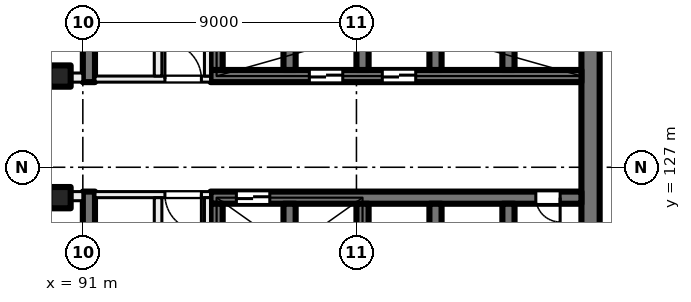
"""IFC4 building model, lengths in metres.
Left out: names, types, materials, properties, quantities, classifications, styles, units other than length and angle.
Written with IfcOpenShell. Run it as: python <this file> out.ifc"""

import sys

from ifc_helpers import new_model, si_unit, direction, frame, frame_2d, origin, origin_2d, place, context, subcontext, project, spatial, rectangle, extrude, element, fill, save


model = new_model("IFC4")
c1 = context("Model", 3, precision=1e-05, world=origin(), true_north=direction((0.0, 1.0)))
c2 = subcontext(c1, "Body", "Model", "MODEL_VIEW")
j1 = project(units=[si_unit("LENGTHUNIT", "METRE"), si_unit("PLANEANGLEUNIT", "RADIAN")], contexts=[c1])
p1 = place(None, origin())
s1 = spatial("IfcSite", under=j1, at=p1, CompositionType="ELEMENT")
p2 = place(p1, origin())
s2 = spatial("IfcBuilding", under=s1, at=p2, CompositionType="ELEMENT")
p3 = place(p2, frame((0.0, 0.0, 59.5)))
s3 = spatial("IfcBuildingStorey", under=s2, at=p3, CompositionType="ELEMENT", Elevation=59.5)
for number, where, z_axis, x_axis in (
    (1, (90.25, 130.0, 0.0), (0.0, 0.0, 1.0), (1.0, 0.0, 0.0)),
    (2, (90.25, 126.0, 0.0), (0.0, 0.0, 1.0), (1.0, 0.0, 0.0)),
):
    element("IfcColumn", number, at=place(p3, frame(where, z_axis=z_axis, x_axis=x_axis)), inside=s3, PredefinedType="COLUMN", context=c2, shape_type="SweptSolid", body=[
        extrude(rectangle(XDim=0.7, YDim=0.7, at=origin_2d()), origin(), (0.0, 0.0, 1.0), 4.0),
    ])
p4 = place(p3, frame((107.7, 135.2, 0.0), z_axis=(0.0, 0.0, 1.0), x_axis=(0.0, -1.0, 0.0)))
e3 = element("IfcWall", 3, at=p4, inside=s3, PredefinedType="SHEAR", context=c2, shape_type="SweptSolid", body=[
    extrude(rectangle(XDim=14.4, YDim=0.6, at=frame_2d((7.2, 0.0))), origin(), (0.0, 0.0, 1.0), 4.0),
])
p5 = place(p3, frame((107.4, 130.0, 0.0), z_axis=(0.0, 0.0, 1.0), x_axis=(-1.0, 0.0, 0.0)))
e4 = element("IfcWall", 4, at=p5, inside=s3, PredefinedType="SHEAR", context=c2, shape_type="SweptSolid", body=[
    extrude(rectangle(XDim=12.2, YDim=0.4, at=frame_2d((6.1, 0.0))), origin(), (0.0, 0.0, 1.0), 4.0),
])
p6 = place(p5, frame((5.45, 0.0, 0.0)))
e5 = element("IfcOpeningElement", 5, at=p6, cuts=e4, PredefinedType="OPENING", context=c2, shape_type="SweptSolid", body=[
    extrude(rectangle(XDim=1.1, YDim=2.1, at=frame_2d((0.55, 1.05))), frame((0.0, 0.21, 0.0), z_axis=(0.0, -1.0, 0.0), x_axis=(1.0, 0.0, 0.0)), (0.0, 0.0, 1.0), 0.42),
])
p7 = place(p5, frame((7.85, 0.0, 0.0)))
e6 = element("IfcOpeningElement", 6, at=p7, cuts=e4, PredefinedType="OPENING", context=c2, shape_type="SweptSolid", body=[
    extrude(rectangle(XDim=1.1, YDim=2.1, at=frame_2d((0.55, 1.05))), frame((0.0, 0.21, 0.0), z_axis=(0.0, -1.0, 0.0), x_axis=(1.0, 0.0, 0.0)), (0.0, 0.0, 1.0), 0.42),
])
for number, where, z_axis, x_axis in (
    (7, (105.0, 133.2, 0.0), (0.0, 0.0, 1.0), (0.0, -1.0, 0.0)),
    (8, (102.6, 133.2, 0.0), (0.0, 0.0, 1.0), (0.0, -1.0, 0.0)),
    (9, (100.2, 133.2, 0.0), (0.0, 0.0, 1.0), (0.0, -1.0, 0.0)),
    (10, (97.8, 133.2, 0.0), (0.0, 0.0, 1.0), (0.0, -1.0, 0.0)),
    (11, (95.4, 133.2, 0.0), (0.0, 0.0, 1.0), (0.0, -1.0, 0.0)),
):
    element("IfcWall", number, at=place(p3, frame(where, z_axis=z_axis, x_axis=x_axis)), inside=s3, PredefinedType="SHEAR", context=c2, shape_type="SweptSolid", body=[
        extrude(rectangle(XDim=3.0, YDim=0.4, at=frame_2d((1.5, 0.0))), origin(), (0.0, 0.0, 1.0), 4.0),
    ])
p8 = place(p3, frame((107.4, 126.0, 0.0), z_axis=(0.0, 0.0, 1.0), x_axis=(-1.0, 0.0, 0.0)))
e12 = element("IfcWall", 12, at=p8, inside=s3, PredefinedType="SHEAR", context=c2, shape_type="SweptSolid", body=[
    extrude(rectangle(XDim=12.2, YDim=0.4, at=frame_2d((6.1, 0.0))), origin(), (0.0, 0.0, 1.0), 4.0),
])
p9 = place(p8, frame((10.25, 0.0, 0.0)))
e13 = element("IfcOpeningElement", 13, at=p9, cuts=e12, PredefinedType="OPENING", context=c2, shape_type="SweptSolid", body=[
    extrude(rectangle(XDim=1.1, YDim=2.1, at=frame_2d((0.55, 1.05))), frame((0.0, 0.21, 0.0), z_axis=(0.0, -1.0, 0.0), x_axis=(1.0, 0.0, 0.0)), (0.0, 0.0, 1.0), 0.42),
])
p10 = place(p8, frame((0.7, 0.0, 0.0)))
e14 = element("IfcOpeningElement", 14, at=p10, cuts=e12, PredefinedType="OPENING", context=c2, shape_type="SweptSolid", body=[
    extrude(rectangle(XDim=0.8, YDim=2.1, at=frame_2d((0.4, 1.05))), frame((0.0, 0.21, 0.0), z_axis=(0.0, -1.0, 0.0), x_axis=(1.0, 0.0, 0.0)), (0.0, 0.0, 1.0), 0.42),
])
for number, where, z_axis, x_axis in (
    (15, (105.0, 125.8, 0.0), (0.0, 0.0, 1.0), (0.0, -1.0, 0.0)),
    (16, (102.6, 125.8, 0.0), (0.0, 0.0, 1.0), (0.0, -1.0, 0.0)),
    (17, (100.2, 125.8, 0.0), (0.0, 0.0, 1.0), (0.0, -1.0, 0.0)),
    (18, (97.8, 125.8, 0.0), (0.0, 0.0, 1.0), (0.0, -1.0, 0.0)),
    (19, (95.4, 125.8, 0.0), (0.0, 0.0, 1.0), (0.0, -1.0, 0.0)),
):
    element("IfcWall", number, at=place(p3, frame(where, z_axis=z_axis, x_axis=x_axis)), inside=s3, PredefinedType="SHEAR", context=c2, shape_type="SweptSolid", body=[
        extrude(rectangle(XDim=3.0, YDim=0.4, at=frame_2d((1.5, 0.0))), origin(), (0.0, 0.0, 1.0), 4.0),
    ])
for number, where, z_axis, x_axis in (
    (20, (91.2, 138.4, 0.0), (0.0, 0.0, 1.0), (0.0, -1.0, 0.0)),
    (21, (91.2, 126.2, 0.0), (0.0, 0.0, 1.0), (0.0, -1.0, 0.0)),
):
    element("IfcWall", number, at=place(p3, frame(where, z_axis=z_axis, x_axis=x_axis)), inside=s3, PredefinedType="SHEAR", context=c2, shape_type="SweptSolid", body=[
        extrude(rectangle(XDim=8.6, YDim=0.4, at=frame_2d((4.3, 0.0))), origin(), (0.0, 0.0, 1.0), 4.0),
    ])
p11 = place(p3, frame((95.2, 126.1, 0.0), z_axis=(0.0, 0.0, 1.0), x_axis=(-1.0, 0.0, 0.0)))
e22 = element("IfcWall", 22, at=p11, inside=s3, PredefinedType="PARTITIONING", context=c2, shape_type="SweptSolid", body=[
    extrude(rectangle(XDim=3.8, YDim=0.2, at=frame_2d((1.9, 0.0))), origin(), (0.0, 0.0, 1.0), 3.625),
])
p12 = place(p11, frame((0.3, 0.0, 0.0)))
e23 = element("IfcOpeningElement", 23, at=p12, cuts=e22, PredefinedType="OPENING", context=c2, shape_type="SweptSolid", body=[
    extrude(rectangle(XDim=1.2, YDim=2.1, at=frame_2d((0.6, 1.05))), frame((0.0, 0.11, 0.0), z_axis=(0.0, -1.0, 0.0), x_axis=(1.0, 0.0, 0.0)), (0.0, 0.0, 1.0), 0.22),
])
p13 = place(p3, frame((95.1, 117.6, 0.0), z_axis=(0.0, 0.0, 1.0), x_axis=(0.0, 1.0, 0.0)))
e24 = element("IfcWall", 24, at=p13, inside=s3, PredefinedType="PARTITIONING", context=c2, shape_type="SweptSolid", body=[
    extrude(rectangle(XDim=8.4, YDim=0.2, at=frame_2d((4.2, 0.0))), origin(), (0.0, 0.0, 1.0), 3.625),
])
p14 = place(p13, frame((1.65, 0.0, 0.0)))
e25 = element("IfcOpeningElement", 25, at=p14, cuts=e24, PredefinedType="OPENING", context=c2, shape_type="SweptSolid", body=[
    extrude(rectangle(XDim=1.5, YDim=2.1, at=frame_2d((0.75, 1.05))), frame((0.0, 0.11, 0.0), z_axis=(0.0, -1.0, 0.0), x_axis=(1.0, 0.0, 0.0)), (0.0, 0.0, 1.0), 0.22),
])
p15 = place(p3, frame((93.475, 117.6, 0.0), z_axis=(0.0, 0.0, 1.0), x_axis=(0.0, 1.0, 0.0)))
e26 = element("IfcWall", 26, at=p15, inside=s3, PredefinedType="PARTITIONING", context=c2, shape_type="SweptSolid", body=[
    extrude(rectangle(XDim=8.4, YDim=0.25, at=frame_2d((4.2, 0.0))), origin(), (0.0, 0.0, 1.0), 3.625),
])
p16 = place(p15, frame((3.8, 0.0, 0.0)))
e27 = element("IfcOpeningElement", 27, at=p16, cuts=e26, PredefinedType="OPENING", context=c2, shape_type="SweptSolid", body=[
    extrude(rectangle(XDim=0.8, YDim=2.1, at=frame_2d((0.4, 1.05))), frame((0.0, 0.135, 0.0), z_axis=(0.0, -1.0, 0.0), x_axis=(1.0, 0.0, 0.0)), (0.0, 0.0, 1.0), 0.27),
])
p17 = place(p3, frame((91.4, 129.9, 0.0), z_axis=(0.0, 0.0, 1.0), x_axis=(1.0, 0.0, 0.0)))
e28 = element("IfcWall", 28, at=p17, inside=s3, PredefinedType="PARTITIONING", context=c2, shape_type="SweptSolid", body=[
    extrude(rectangle(XDim=3.8, YDim=0.2, at=frame_2d((1.9, 0.0))), origin(), (0.0, 0.0, 1.0), 3.625),
])
p18 = place(p17, frame((2.3, 0.0, 0.0)))
e29 = element("IfcOpeningElement", 29, at=p18, cuts=e28, PredefinedType="OPENING", context=c2, shape_type="SweptSolid", body=[
    extrude(rectangle(XDim=1.2, YDim=2.1, at=frame_2d((0.6, 1.05))), frame((0.0, 0.11, 0.0), z_axis=(0.0, -1.0, 0.0), x_axis=(1.0, 0.0, 0.0)), (0.0, 0.0, 1.0), 0.22),
])
p19 = place(p3, frame((95.1, 130.0, 0.0), z_axis=(0.0, 0.0, 1.0), x_axis=(0.0, 1.0, 0.0)))
e30 = element("IfcWall", 30, at=p19, inside=s3, PredefinedType="PARTITIONING", context=c2, shape_type="SweptSolid", body=[
    extrude(rectangle(XDim=8.4, YDim=0.2, at=frame_2d((4.2, 0.0))), origin(), (0.0, 0.0, 1.0), 3.625),
])
p20 = place(p19, frame((5.25, 0.0, 0.0)))
e31 = element("IfcOpeningElement", 31, at=p20, cuts=e30, PredefinedType="OPENING", context=c2, shape_type="SweptSolid", body=[
    extrude(rectangle(XDim=1.5, YDim=2.1, at=frame_2d((0.75, 1.05))), frame((0.0, 0.11, 0.0), z_axis=(0.0, -1.0, 0.0), x_axis=(1.0, 0.0, 0.0)), (0.0, 0.0, 1.0), 0.22),
])
p21 = place(p3, frame((93.475, 130.0, 0.0), z_axis=(0.0, 0.0, 1.0), x_axis=(0.0, 1.0, 0.0)))
e32 = element("IfcWall", 32, at=p21, inside=s3, PredefinedType="PARTITIONING", context=c2, shape_type="SweptSolid", body=[
    extrude(rectangle(XDim=8.4, YDim=0.25, at=frame_2d((4.2, 0.0))), origin(), (0.0, 0.0, 1.0), 3.625),
])
p22 = place(p21, frame((2.375, 0.0, 0.0)))
e33 = element("IfcOpeningElement", 33, at=p22, cuts=e32, PredefinedType="OPENING", context=c2, shape_type="SweptSolid", body=[
    extrude(rectangle(XDim=0.8, YDim=2.1, at=frame_2d((0.4, 1.05))), frame((0.0, 0.135, 0.0), z_axis=(0.0, -1.0, 0.0), x_axis=(1.0, 0.0, 0.0)), (0.0, 0.0, 1.0), 0.27),
])
p23 = place(p21, frame((6.625, 0.0, 0.0)))
e34 = element("IfcOpeningElement", 34, at=p23, cuts=e32, PredefinedType="OPENING", context=c2, shape_type="SweptSolid", body=[
    extrude(rectangle(XDim=0.8, YDim=2.1, at=frame_2d((0.4, 1.05))), frame((0.0, 0.135, 0.0), z_axis=(0.0, -1.0, 0.0), x_axis=(1.0, 0.0, 0.0)), (0.0, 0.0, 1.0), 0.27),
])
p24 = place(p3, frame((72.5, 129.95, 0.0), z_axis=(0.0, 0.0, 1.0), x_axis=(1.0, 0.0, 0.0)))
e35 = element("IfcWall", 35, at=p24, inside=s3, PredefinedType="PARTITIONING", context=c2, shape_type="SweptSolid", body=[
    extrude(rectangle(XDim=18.5, YDim=0.3, at=frame_2d((9.25, 0.0))), origin(), (0.0, 0.0, 1.0), 3.625),
])
p25 = place(p24, frame((9.85, 0.0, 0.0)))
e36 = element("IfcOpeningElement", 36, at=p25, cuts=e35, PredefinedType="OPENING", context=c2, shape_type="SweptSolid", body=[
    extrude(rectangle(XDim=0.8, YDim=2.1, at=frame_2d((0.4, 1.05))), frame((0.0, 0.16, 0.0), z_axis=(0.0, -1.0, 0.0), x_axis=(1.0, 0.0, 0.0)), (0.0, 0.0, 1.0), 0.32),
])
p26 = place(p24, frame((14.625, 0.0, 0.0)))
e37 = element("IfcOpeningElement", 37, at=p26, cuts=e35, PredefinedType="OPENING", context=c2, shape_type="SweptSolid", body=[
    extrude(rectangle(XDim=1.0, YDim=2.1, at=frame_2d((0.5, 1.05))), frame((0.0, 0.16, 0.0), z_axis=(0.0, -1.0, 0.0), x_axis=(1.0, 0.0, 0.0)), (0.0, 0.0, 1.0), 0.32),
])
p27 = place(p24, frame((6.0, 0.0, 0.0)))
e38 = element("IfcOpeningElement", 38, at=p27, cuts=e35, PredefinedType="OPENING", context=c2, shape_type="SweptSolid", body=[
    extrude(rectangle(XDim=1.0, YDim=2.1, at=frame_2d((0.5, 1.05))), frame((0.0, 0.16, 0.0), z_axis=(0.0, -1.0, 0.0), x_axis=(1.0, 0.0, 0.0)), (0.0, 0.0, 1.0), 0.32),
])
p28 = place(p24, frame((1.625, 0.0, 0.0)))
e39 = element("IfcOpeningElement", 39, at=p28, cuts=e35, PredefinedType="OPENING", context=c2, shape_type="SweptSolid", body=[
    extrude(rectangle(XDim=1.0, YDim=2.1, at=frame_2d((0.5, 1.05))), frame((0.0, 0.16, 0.0), z_axis=(0.0, -1.0, 0.0), x_axis=(1.0, 0.0, 0.0)), (0.0, 0.0, 1.0), 0.32),
])
p29 = place(p3, frame((91.0, 126.05, 0.0), z_axis=(0.0, 0.0, 1.0), x_axis=(-1.0, 0.0, 0.0)))
e40 = element("IfcWall", 40, at=p29, inside=s3, PredefinedType="PARTITIONING", context=c2, shape_type="SweptSolid", body=[
    extrude(rectangle(XDim=43.785, YDim=0.3, at=frame_2d((21.893, 0.0))), origin(), (0.0, 0.0, 1.0), 3.625),
])
p30 = place(p29, frame((2.125, 0.0, 0.0)))
e41 = element("IfcOpeningElement", 41, at=p30, cuts=e40, PredefinedType="OPENING", context=c2, shape_type="SweptSolid", body=[
    extrude(rectangle(XDim=1.0, YDim=2.1, at=frame_2d((0.5, 1.05))), frame((0.0, 0.16, 0.0), z_axis=(0.0, -1.0, 0.0), x_axis=(1.0, 0.0, 0.0)), (0.0, 0.0, 1.0), 0.32),
])
p31 = place(p29, frame((7.0, 0.0, 0.0)))
e42 = element("IfcOpeningElement", 42, at=p31, cuts=e40, PredefinedType="OPENING", context=c2, shape_type="SweptSolid", body=[
    extrude(rectangle(XDim=1.0, YDim=2.1, at=frame_2d((0.5, 1.05))), frame((0.0, 0.16, 0.0), z_axis=(0.0, -1.0, 0.0), x_axis=(1.0, 0.0, 0.0)), (0.0, 0.0, 1.0), 0.32),
])
p32 = place(p29, frame((11.5, 0.0, 0.0)))
e43 = element("IfcOpeningElement", 43, at=p32, cuts=e40, PredefinedType="OPENING", context=c2, shape_type="SweptSolid", body=[
    extrude(rectangle(XDim=1.0, YDim=2.1, at=frame_2d((0.5, 1.05))), frame((0.0, 0.16, 0.0), z_axis=(0.0, -1.0, 0.0), x_axis=(1.0, 0.0, 0.0)), (0.0, 0.0, 1.0), 0.32),
])
p33 = place(p29, frame((15.9, 0.0, 0.0)))
e44 = element("IfcOpeningElement", 44, at=p33, cuts=e40, PredefinedType="OPENING", context=c2, shape_type="SweptSolid", body=[
    extrude(rectangle(XDim=1.2, YDim=2.1, at=frame_2d((0.6, 1.05))), frame((0.0, 0.16, 0.0), z_axis=(0.0, -1.0, 0.0), x_axis=(1.0, 0.0, 0.0)), (0.0, 0.0, 1.0), 0.32),
])
p34 = place(p29, frame((22.35, 0.0, 0.0)))
e45 = element("IfcOpeningElement", 45, at=p34, cuts=e40, PredefinedType="OPENING", context=c2, shape_type="SweptSolid", body=[
    extrude(rectangle(XDim=1.8, YDim=2.1, at=frame_2d((0.9, 1.05))), frame((0.0, 0.16, 0.0), z_axis=(0.0, -1.0, 0.0), x_axis=(1.0, 0.0, 0.0)), (0.0, 0.0, 1.0), 0.32),
])
p35 = place(p29, frame((34.0, 0.0, 0.0)))
e46 = element("IfcOpeningElement", 46, at=p35, cuts=e40, PredefinedType="OPENING", context=c2, shape_type="SweptSolid", body=[
    extrude(rectangle(XDim=1.0, YDim=2.1, at=frame_2d((0.5, 1.05))), frame((0.0, 0.16, 0.0), z_axis=(0.0, -1.0, 0.0), x_axis=(1.0, 0.0, 0.0)), (0.0, 0.0, 1.0), 0.32),
])
p36 = place(p29, frame((39.296, 0.0, 0.0)))
e47 = element("IfcOpeningElement", 47, at=p36, cuts=e40, PredefinedType="OPENING", context=c2, shape_type="SweptSolid", body=[
    extrude(rectangle(XDim=1.8, YDim=2.1, at=frame_2d((0.9, 1.05))), frame((0.0, 0.16, 0.0), z_axis=(0.0, -1.0, 0.0), x_axis=(1.0, 0.0, 0.0)), (0.0, 0.0, 1.0), 0.32),
])
p37 = place(p9, origin())
e48 = element("IfcDoor", 48, at=p37, inside=s3, OperationType="DOUBLE_DOOR_SLIDING", PredefinedType="DOOR", context=c2, shape_type="SweptSolid", body=[
    extrude(rectangle(XDim=1.1, YDim=2.1, at=frame_2d((0.55, 1.05))), frame((0.0, 0.025, 0.0), z_axis=(0.0, -1.0, 0.0), x_axis=(1.0, 0.0, 0.0)), (0.0, 0.0, 1.0), 0.05),
])
fill(e13, e48)
p38 = place(p6, origin())
e49 = element("IfcDoor", 49, at=p38, inside=s3, OperationType="DOUBLE_DOOR_SLIDING", PredefinedType="DOOR", context=c2, shape_type="SweptSolid", body=[
    extrude(rectangle(XDim=1.1, YDim=2.1, at=frame_2d((0.55, 1.05))), frame((0.0, 0.025, 0.0), z_axis=(0.0, -1.0, 0.0), x_axis=(1.0, 0.0, 0.0)), (0.0, 0.0, 1.0), 0.05),
])
fill(e5, e49)
p39 = place(p7, origin())
e50 = element("IfcDoor", 50, at=p39, inside=s3, OperationType="DOUBLE_DOOR_SLIDING", PredefinedType="DOOR", context=c2, shape_type="SweptSolid", body=[
    extrude(rectangle(XDim=1.1, YDim=2.1, at=frame_2d((0.55, 1.05))), frame((0.0, 0.025, 0.0), z_axis=(0.0, -1.0, 0.0), x_axis=(1.0, 0.0, 0.0)), (0.0, 0.0, 1.0), 0.05),
])
fill(e6, e50)
p40 = place(p10, origin())
e51 = element("IfcDoor", 51, at=p40, inside=s3, OperationType="SINGLE_SWING_LEFT", PredefinedType="DOOR", context=c2, shape_type="SweptSolid", body=[
    extrude(rectangle(XDim=0.8, YDim=2.1, at=frame_2d((0.4, 1.05))), frame((0.0, 0.025, 0.0), z_axis=(0.0, -1.0, 0.0), x_axis=(1.0, 0.0, 0.0)), (0.0, 0.0, 1.0), 0.05),
])
fill(e14, e51)
p41 = place(p12, origin())
e52 = element("IfcDoor", 52, at=p41, inside=s3, OperationType="DOUBLE_DOOR_SINGLE_SWING", PredefinedType="DOOR", context=c2, shape_type="SweptSolid", body=[
    extrude(rectangle(XDim=1.2, YDim=2.1, at=frame_2d((0.6, 1.05))), frame((0.0, 0.025, 0.0), z_axis=(0.0, -1.0, 0.0), x_axis=(1.0, 0.0, 0.0)), (0.0, 0.0, 1.0), 0.05),
])
fill(e23, e52)
p42 = place(p18, origin())
e53 = element("IfcDoor", 53, at=p42, inside=s3, OperationType="DOUBLE_DOOR_SINGLE_SWING", PredefinedType="DOOR", context=c2, shape_type="SweptSolid", body=[
    extrude(rectangle(XDim=1.2, YDim=2.1, at=frame_2d((0.6, 1.05))), frame((0.0, 0.025, 0.0), z_axis=(0.0, -1.0, 0.0), x_axis=(1.0, 0.0, 0.0)), (0.0, 0.0, 1.0), 0.05),
])
fill(e29, e53)
save(model, sys.argv[1])
